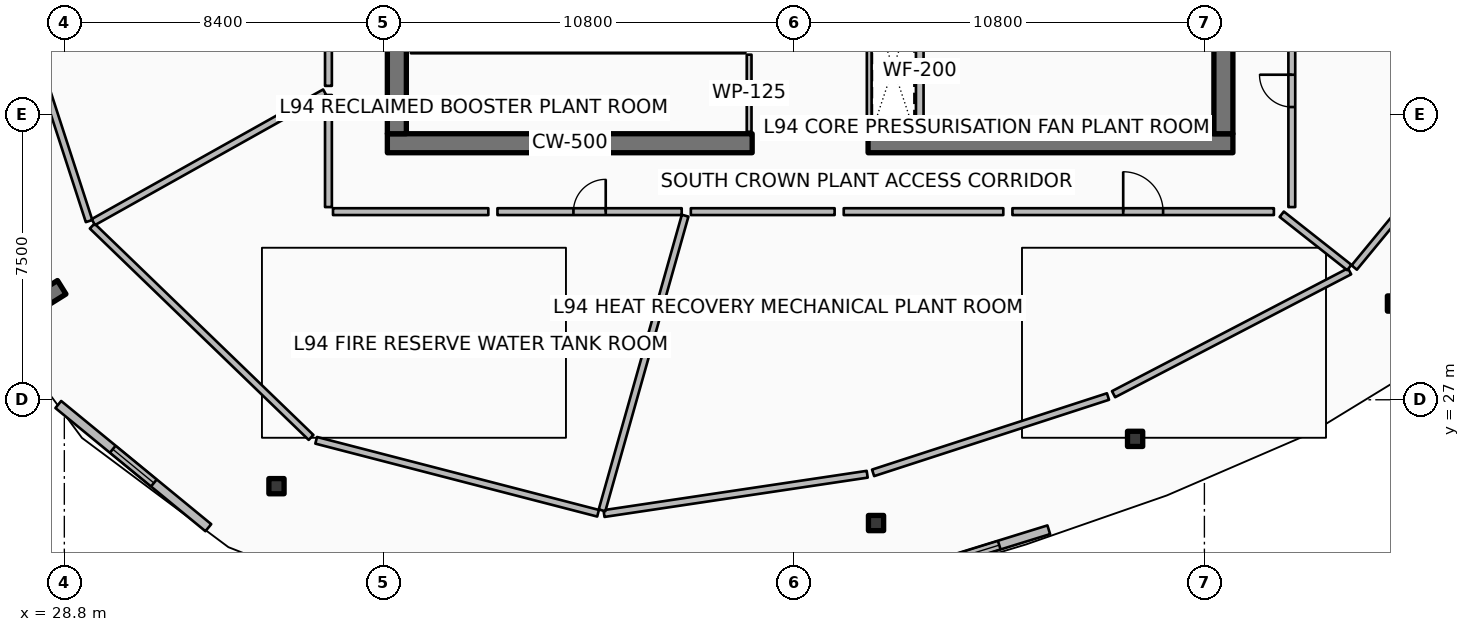
"""IFC4 building model, lengths in metres.
Left out: names, types, materials, properties, quantities, classifications, styles, units other than length and angle.
Written with IfcOpenShell. Run it as: python <this file> out.ifc"""

import sys

from ifc_helpers import new_model, si_unit, direction, frame, frame_2d, origin, origin_2d, place, context, subcontext, project, spatial, rectangle, hollow_rectangle, extrude, element, fill, save


model = new_model("IFC4")
c1 = context("Model", 3, precision=1e-05, world=origin(), true_north=direction((0.0, 1.0)))
c2 = subcontext(c1, "Body", "Model", "MODEL_VIEW")
j1 = project(units=[si_unit("LENGTHUNIT", "METRE"), si_unit("PLANEANGLEUNIT", "RADIAN")], contexts=[c1])
p1 = place(None, origin())
s1 = spatial("IfcSite", under=j1, at=p1, CompositionType="ELEMENT")
p2 = place(p1, origin())
s2 = spatial("IfcBuilding", under=s1, at=p2, CompositionType="ELEMENT")
p3 = place(p2, frame((0.0, 0.0, 374.0)))
s3 = spatial("IfcBuildingStorey", under=s2, at=p3, CompositionType="ELEMENT", Elevation=374.0)
p4 = place(p3, frame((37.3, 33.75, 0.0), z_axis=(0.0, 0.0, 1.0), x_axis=(1.0, 0.0, 0.0)))
e1 = element("IfcWall", 1, at=p4, inside=s3, PredefinedType="SHEAR", context=c2, shape_type="SweptSolid", body=[
    extrude(rectangle(XDim=9.6, YDim=0.5, at=frame_2d((4.8, 0.0))), origin(), (0.0, 0.0, 1.0), 3.6),
])
p5 = place(p3, frame((49.95, 33.75, 0.0), z_axis=(0.0, 0.0, 1.0), x_axis=(1.0, 0.0, 0.0)))
e2 = element("IfcWall", 2, at=p5, inside=s3, PredefinedType="SHEAR", context=c2, shape_type="SweptSolid", body=[
    extrude(rectangle(XDim=9.6, YDim=0.5, at=frame_2d((4.8, 0.0))), origin(), (0.0, 0.0, 1.0), 3.6),
])
for number, where, z_axis, x_axis in (
    (3, (37.55, 34.0, 0.0), (0.0, 0.0, 1.0), (0.0, 1.0, 0.0)),
    (4, (59.3, 34.0, 0.0), (0.0, 0.0, 1.0), (0.0, 1.0, 0.0)),
):
    element("IfcWall", number, at=place(p3, frame(where, z_axis=z_axis, x_axis=x_axis)), inside=s3, PredefinedType="SHEAR", context=c2, shape_type="SweptSolid", body=[
        extrude(rectangle(XDim=16.0, YDim=0.5, at=frame_2d((8.0, 0.0))), origin(), (0.0, 0.0, 1.0), 3.6),
    ])
p6 = place(p3, frame((28.731, 29.959, 0.0), z_axis=(0.0, 0.0, 1.0), x_axis=(-0.848033572426, -0.529942506352, 0.0)))
e5 = element("IfcWall", 5, at=p6, inside=s3, PredefinedType="SOLIDWALL", context=c2, shape_type="SweptSolid", body=[
    extrude(rectangle(XDim=3.5, YDim=0.42, at=frame_2d((1.75, 0.0))), origin(), (0.0, 0.0, 1.0), 3.6),
])
for number, where, z_axis, x_axis in (
    (6, (34.383, 24.726, 0.0), (0.0, 0.0, 1.0), (1.0, 0.0, 0.0)),
    (7, (50.159, 23.756, 0.0), (0.0, 0.0, 1.0), (1.0, 0.0, 0.0)),
    (8, (56.977, 25.971, 0.0), (0.0, 0.0, 1.0), (1.0, 0.0, 0.0)),
    (9, (63.815, 29.532, 0.0), (0.0, 0.0, 1.0), (1.0, 0.0, 0.0)),
):
    element("IfcColumn", number, at=place(p3, frame(where, z_axis=z_axis, x_axis=x_axis)), inside=s3, PredefinedType="COLUMN", context=c2, shape_type="SweptSolid", body=[
        extrude(hollow_rectangle(XDim=0.4, YDim=0.4, WallThickness=0.02, InnerFilletRadius=0.02, OuterFilletRadius=0.04, at=origin_2d()), origin(), (0.0, 0.0, 1.0), 3.36),
    ])
p7 = place(p3, frame((28.641, 26.875, 0.0), z_axis=(0.0, 0.0, 1.0), x_axis=(0.772921300133, -0.634501902125, 0.0)))
e10 = element("IfcWall", 10, at=p7, inside=s3, PredefinedType="SOLIDWALL", context=c2, shape_type="SweptSolid", body=[
    extrude(rectangle(XDim=5.108, YDim=0.24, at=frame_2d((2.554, 0.0))), origin(), (0.0, 0.0, 1.0), 2.41),
])
p8 = place(p7, frame((1.854, 0.0, 1.35)))
e11 = element("IfcOpeningElement", 11, at=p8, cuts=e10, PredefinedType="OPENING", context=c2, shape_type="SweptSolid", body=[
    extrude(rectangle(XDim=1.4, YDim=0.75, at=frame_2d((0.7, 0.375))), frame((0.0, 0.13, 0.0), z_axis=(0.0, -1.0, 0.0), x_axis=(1.0, 0.0, 0.0)), (0.0, 0.0, 1.0), 0.26),
])
p9 = place(p3, frame((50.76, 22.358, 0.0), z_axis=(0.0, 0.0, 1.0), x_axis=(0.955241739185, 0.295826333714, 0.0)))
e12 = element("IfcWall", 12, at=p9, inside=s3, PredefinedType="SOLIDWALL", context=c2, shape_type="SweptSolid", body=[
    extrude(rectangle(XDim=4.129, YDim=0.24, at=frame_2d((2.064, 0.0))), origin(), (0.0, 0.0, 1.0), 2.41),
])
p10 = place(p9, frame((1.365, 0.0, 1.35)))
e13 = element("IfcOpeningElement", 13, at=p10, cuts=e12, PredefinedType="OPENING", context=c2, shape_type="SweptSolid", body=[
    extrude(rectangle(XDim=1.4, YDim=0.75, at=frame_2d((0.7, 0.375))), frame((0.0, 0.13, 0.0), z_axis=(0.0, -1.0, 0.0), x_axis=(1.0, 0.0, 0.0)), (0.0, 0.0, 1.0), 0.26),
])
p11 = place(p3, frame((51.31, 34.05, 0.0), z_axis=(0.0, 0.0, 1.0), x_axis=(0.0, 1.0, 0.0)))
e14 = element("IfcWall", 14, at=p11, inside=s3, PredefinedType="PARTITIONING", context=c2, shape_type="SweptSolid", body=[
    extrude(rectangle(XDim=3.21, YDim=0.2, at=frame_2d((1.605, 0.0))), origin(), (0.0, 0.0, 1.0), 3.36),
])
p12 = place(p3, frame((46.82, 34.05, 0.0), z_axis=(0.0, 0.0, 1.0), x_axis=(0.0, 1.0, 0.0)))
e15 = element("IfcWall", 15, at=p12, inside=s3, PredefinedType="PARTITIONING", context=c2, shape_type="SweptSolid", body=[
    extrude(rectangle(XDim=2.03, YDim=0.125, at=frame_2d((1.015, 0.0))), origin(), (0.0, 0.0, 1.0), 2.8),
])
p13 = place(p3, frame((37.92, 36.18, 0.0), z_axis=(0.0, 0.0, 1.0), x_axis=(1.0, 0.0, 0.0)))
e16 = element("IfcWall", 16, at=p13, inside=s3, PredefinedType="PARTITIONING", context=c2, shape_type="SweptSolid", body=[
    extrude(rectangle(XDim=8.8, YDim=0.125, at=frame_2d((4.4, 0.0))), origin(), (0.0, 0.0, 1.0), 2.8),
])
p14 = place(p13, frame((3.975, 0.0, 0.0)))
e17 = element("IfcOpeningElement", 17, at=p14, cuts=e16, PredefinedType="OPENING", context=c2, shape_type="SweptSolid", body=[
    extrude(rectangle(XDim=0.85, YDim=2.06, at=frame_2d((0.425, 1.03))), frame((0.0, 0.073, 0.0), z_axis=(0.0, -1.0, 0.0), x_axis=(1.0, 0.0, 0.0)), (0.0, 0.0, 1.0), 0.145),
])
p15 = place(p3, frame((49.98, 34.06, 0.0), z_axis=(0.0, 0.0, 1.0), x_axis=(0.0, 1.0, 0.0)))
e18 = element("IfcWall", 18, at=p15, inside=s3, PredefinedType="PARTITIONING", context=c2, shape_type="SweptSolid", body=[
    extrude(rectangle(XDim=3.4, YDim=0.125, at=frame_2d((1.7, 0.0))), origin(), (0.0, 0.0, 1.0), 2.8),
])
p16 = place(p3, frame((26.941, 39.428, 0.0), z_axis=(0.0, 0.0, 1.0), x_axis=(0.309024234991, -0.951054163646, 0.0)))
e19 = element("IfcWall", 19, at=p16, inside=s3, PredefinedType="PARTITIONING", context=c2, shape_type="SweptSolid", body=[
    extrude(rectangle(XDim=8.124, YDim=0.18, at=frame_2d((4.062, 0.0))), origin(), (0.0, 0.0, 1.0), 2.8),
])
p17 = place(p3, frame((29.533, 31.57, 0.0), z_axis=(0.0, 0.0, 1.0), x_axis=(0.719364153135, -0.694633151516, 0.0)))
e20 = element("IfcWall", 20, at=p17, inside=s3, PredefinedType="PARTITIONING", context=c2, shape_type="SweptSolid", body=[
    extrude(rectangle(XDim=8.006, YDim=0.18, at=frame_2d((4.003, 0.0))), origin(), (0.0, 0.0, 1.0), 2.8),
])
p18 = place(p3, frame((35.427, 25.934, 0.0), z_axis=(0.0, 0.0, 1.0), x_axis=(0.968117205342, -0.250497658115, 0.0)))
e21 = element("IfcWall", 21, at=p18, inside=s3, PredefinedType="PARTITIONING", context=c2, shape_type="SweptSolid", body=[
    extrude(rectangle(XDim=7.662, YDim=0.18, at=frame_2d((3.831, 0.0))), origin(), (0.0, 0.0, 1.0), 2.8),
])
p19 = place(p3, frame((43.001, 24.006, 0.0), z_axis=(0.0, 0.0, 1.0), x_axis=(0.989034336252, 0.147685753256, 0.0)))
e22 = element("IfcWall", 22, at=p19, inside=s3, PredefinedType="PARTITIONING", context=c2, shape_type="SweptSolid", body=[
    extrude(rectangle(XDim=7.003, YDim=0.18, at=frame_2d((3.501, 0.0))), origin(), (0.0, 0.0, 1.0), 2.8),
])
p20 = place(p3, frame((50.082, 25.077, 0.0), z_axis=(0.0, 0.0, 1.0), x_axis=(0.95105283999, 0.309028308649, 0.0)))
e23 = element("IfcWall", 23, at=p20, inside=s3, PredefinedType="PARTITIONING", context=c2, shape_type="SweptSolid", body=[
    extrude(rectangle(XDim=6.499, YDim=0.18, at=frame_2d((3.25, 0.0))), origin(), (0.0, 0.0, 1.0), 2.8),
])
p21 = place(p3, frame((56.41, 27.147, 0.0), z_axis=(0.0, 0.0, 1.0), x_axis=(0.886949494865, 0.461866423935, 0.0)))
e24 = element("IfcWall", 24, at=p21, inside=s3, PredefinedType="PARTITIONING", context=c2, shape_type="SweptSolid", body=[
    extrude(rectangle(XDim=7.002, YDim=0.18, at=frame_2d((3.501, 0.0))), origin(), (0.0, 0.0, 1.0), 2.8),
])
p22 = place(p3, frame((62.742, 30.48, 0.0), z_axis=(0.0, 0.0, 1.0), x_axis=(0.636018833443, 0.771673534278, 0.0)))
e25 = element("IfcWall", 25, at=p22, inside=s3, PredefinedType="PARTITIONING", context=c2, shape_type="SweptSolid", body=[
    extrude(rectangle(XDim=7.661, YDim=0.18, at=frame_2d((3.831, 0.0))), origin(), (0.0, 0.0, 1.0), 2.8),
])
p23 = place(p3, frame((35.75, 40.43, 0.0), z_axis=(0.0, 0.0, 1.0), x_axis=(0.0, -1.0, 0.0)))
e26 = element("IfcWall", 26, at=p23, inside=s3, PredefinedType="PARTITIONING", context=c2, shape_type="SweptSolid", body=[
    extrude(rectangle(XDim=5.17, YDim=0.18, at=frame_2d((2.585, 0.0))), origin(), (0.0, 0.0, 1.0), 2.8),
])
p24 = place(p23, frame((2.06, 0.0, 0.0)))
e27 = element("IfcOpeningElement", 27, at=p24, cuts=e26, PredefinedType="OPENING", context=c2, shape_type="SweptSolid", body=[
    extrude(rectangle(XDim=1.05, YDim=2.1, at=frame_2d((0.525, 1.05))), frame((0.0, 0.1, 0.0), z_axis=(0.0, -1.0, 0.0), x_axis=(1.0, 0.0, 0.0)), (0.0, 0.0, 1.0), 0.2),
])
p25 = place(p3, frame((35.654, 35.086, 0.0), z_axis=(0.0, 0.0, 1.0), x_axis=(-0.872497667023, -0.488618277432, 0.0)))
e28 = element("IfcWall", 28, at=p25, inside=s3, PredefinedType="PARTITIONING", context=c2, shape_type="SweptSolid", body=[
    extrude(rectangle(XDim=6.981, YDim=0.18, at=frame_2d((3.491, 0.0))), origin(), (0.0, 0.0, 1.0), 2.8),
])
p26 = place(p3, frame((35.75, 35.02, 0.0), z_axis=(0.0, 0.0, 1.0), x_axis=(0.0, -1.0, 0.0)))
e29 = element("IfcWall", 29, at=p26, inside=s3, PredefinedType="PARTITIONING", context=c2, shape_type="SweptSolid", body=[
    extrude(rectangle(XDim=2.95, YDim=0.18, at=frame_2d((1.475, 0.0))), origin(), (0.0, 0.0, 1.0), 2.8),
])
p27 = place(p3, frame((35.87, 31.95, 0.0), z_axis=(0.0, 0.0, 1.0), x_axis=(1.0, 0.0, 0.0)))
e30 = element("IfcWall", 30, at=p27, inside=s3, PredefinedType="PARTITIONING", context=c2, shape_type="SweptSolid", body=[
    extrude(rectangle(XDim=4.087, YDim=0.18, at=frame_2d((2.043, 0.0))), origin(), (0.0, 0.0, 1.0), 2.8),
])
p28 = place(p3, frame((40.197, 31.95, 0.0), z_axis=(0.0, 0.0, 1.0), x_axis=(1.0, 0.0, 0.0)))
e31 = element("IfcWall", 31, at=p28, inside=s3, PredefinedType="PARTITIONING", context=c2, shape_type="SweptSolid", body=[
    extrude(rectangle(XDim=4.848, YDim=0.18, at=frame_2d((2.424, 0.0))), origin(), (0.0, 0.0, 1.0), 2.8),
])
p29 = place(p28, frame((1.999, 0.0, 0.0)))
e32 = element("IfcOpeningElement", 32, at=p29, cuts=e31, PredefinedType="OPENING", context=c2, shape_type="SweptSolid", body=[
    extrude(rectangle(XDim=0.85, YDim=2.06, at=frame_2d((0.425, 1.03))), frame((0.0, 0.1, 0.0), z_axis=(0.0, -1.0, 0.0), x_axis=(1.0, 0.0, 0.0)), (0.0, 0.0, 1.0), 0.2),
])
p30 = place(p3, frame((45.136, 31.844, 0.0), z_axis=(0.0, 0.0, 1.0), x_axis=(-0.271457285698, -0.962450488099, 0.0)))
e33 = element("IfcWall", 33, at=p30, inside=s3, PredefinedType="PARTITIONING", context=c2, shape_type="SweptSolid", body=[
    extrude(rectangle(XDim=8.056, YDim=0.18, at=frame_2d((4.028, 0.0))), origin(), (0.0, 0.0, 1.0), 2.8),
])
p31 = place(p3, frame((45.286, 31.95, 0.0), z_axis=(0.0, 0.0, 1.0), x_axis=(1.0, 0.0, 0.0)))
e34 = element("IfcWall", 34, at=p31, inside=s3, PredefinedType="PARTITIONING", context=c2, shape_type="SweptSolid", body=[
    extrude(rectangle(XDim=3.784, YDim=0.18, at=frame_2d((1.892, 0.0))), origin(), (0.0, 0.0, 1.0), 2.8),
])
p32 = place(p3, frame((49.31, 31.95, 0.0), z_axis=(0.0, 0.0, 1.0), x_axis=(1.0, 0.0, 0.0)))
e35 = element("IfcWall", 35, at=p32, inside=s3, PredefinedType="PARTITIONING", context=c2, shape_type="SweptSolid", body=[
    extrude(rectangle(XDim=4.199, YDim=0.18, at=frame_2d((2.099, 0.0))), origin(), (0.0, 0.0, 1.0), 2.8),
])
p33 = place(p3, frame((53.748, 31.95, 0.0), z_axis=(0.0, 0.0, 1.0), x_axis=(1.0, 0.0, 0.0)))
e36 = element("IfcWall", 36, at=p33, inside=s3, PredefinedType="PARTITIONING", context=c2, shape_type="SweptSolid", body=[
    extrude(rectangle(XDim=6.88, YDim=0.18, at=frame_2d((3.44, 0.0))), origin(), (0.0, 0.0, 1.0), 2.8),
])
p34 = place(p33, frame((2.915, 0.0, 0.0)))
e37 = element("IfcOpeningElement", 37, at=p34, cuts=e36, PredefinedType="OPENING", context=c2, shape_type="SweptSolid", body=[
    extrude(rectangle(XDim=1.05, YDim=2.1, at=frame_2d((0.525, 1.05))), frame((0.0, 0.1, 0.0), z_axis=(0.0, -1.0, 0.0), x_axis=(1.0, 0.0, 0.0)), (0.0, 0.0, 1.0), 0.2),
])
p35 = place(p3, frame((60.835, 31.882, 0.0), z_axis=(0.0, 0.0, 1.0), x_axis=(0.785329646864, -0.619077818821, 0.0)))
e38 = element("IfcWall", 38, at=p35, inside=s3, PredefinedType="PARTITIONING", context=c2, shape_type="SweptSolid", body=[
    extrude(rectangle(XDim=2.264, YDim=0.18, at=frame_2d((1.132, 0.0))), origin(), (0.0, 0.0, 1.0), 2.8),
])
p36 = place(p3, frame((61.1, 32.07, 0.0), z_axis=(0.0, 0.0, 1.0), x_axis=(0.0, 1.0, 0.0)))
e39 = element("IfcWall", 39, at=p36, inside=s3, PredefinedType="PARTITIONING", context=c2, shape_type="SweptSolid", body=[
    extrude(rectangle(XDim=6.115, YDim=0.18, at=frame_2d((3.058, 0.0))), origin(), (0.0, 0.0, 1.0), 2.8),
])
p37 = place(p36, frame((2.633, 0.0, 0.0)))
e40 = element("IfcOpeningElement", 40, at=p37, cuts=e39, PredefinedType="OPENING", context=c2, shape_type="SweptSolid", body=[
    extrude(rectangle(XDim=0.85, YDim=2.06, at=frame_2d((0.425, 1.03))), frame((0.0, 0.1, 0.0), z_axis=(0.0, -1.0, 0.0), x_axis=(1.0, 0.0, 0.0)), (0.0, 0.0, 1.0), 0.2),
])
p38 = place(p8, origin())
e41 = element("IfcWindow", 41, at=p38, inside=s3, PartitioningType="SINGLE_PANEL", PredefinedType="SKYLIGHT", context=c2, shape_type="SweptSolid", body=[
    extrude(rectangle(XDim=1.4, YDim=0.75, at=frame_2d((0.7, 0.375))), frame((0.0, 0.03, 0.0), z_axis=(0.0, -1.0, 0.0), x_axis=(1.0, 0.0, 0.0)), (0.0, 0.0, 1.0), 0.06),
])
fill(e11, e41)
p39 = place(p10, origin())
e42 = element("IfcWindow", 42, at=p39, inside=s3, PartitioningType="SINGLE_PANEL", PredefinedType="SKYLIGHT", context=c2, shape_type="SweptSolid", body=[
    extrude(rectangle(XDim=1.4, YDim=0.75, at=frame_2d((0.7, 0.375))), frame((0.0, 0.03, 0.0), z_axis=(0.0, -1.0, 0.0), x_axis=(1.0, 0.0, 0.0)), (0.0, 0.0, 1.0), 0.06),
])
fill(e13, e42)
p40 = place(p29, origin())
e43 = element("IfcDoor", 43, at=p40, inside=s3, OperationType="SINGLE_SWING_RIGHT", PredefinedType="DOOR", context=c2, shape_type="SweptSolid", body=[
    extrude(rectangle(XDim=0.85, YDim=2.06, at=frame_2d((0.425, 1.03))), frame((0.0, 0.025, 0.0), z_axis=(0.0, -1.0, 0.0), x_axis=(1.0, 0.0, 0.0)), (0.0, 0.0, 1.0), 0.05),
])
fill(e32, e43)
p41 = place(p34, origin())
e44 = element("IfcDoor", 44, at=p41, inside=s3, OperationType="SINGLE_SWING_LEFT", PredefinedType="DOOR", context=c2, shape_type="SweptSolid", body=[
    extrude(rectangle(XDim=1.05, YDim=2.1, at=frame_2d((0.525, 1.05))), frame((0.0, 0.025, 0.0), z_axis=(0.0, -1.0, 0.0), x_axis=(1.0, 0.0, 0.0)), (0.0, 0.0, 1.0), 0.05),
])
fill(e37, e44)
p42 = place(p37, origin())
e45 = element("IfcDoor", 45, at=p42, inside=s3, OperationType="SINGLE_SWING_RIGHT", PredefinedType="DOOR", context=c2, shape_type="SweptSolid", body=[
    extrude(rectangle(XDim=0.85, YDim=2.06, at=frame_2d((0.425, 1.03))), frame((0.0, 0.025, 0.0), z_axis=(0.0, -1.0, 0.0), x_axis=(1.0, 0.0, 0.0)), (0.0, 0.0, 1.0), 0.05),
])
fill(e40, e45)
save(model, sys.argv[1])
